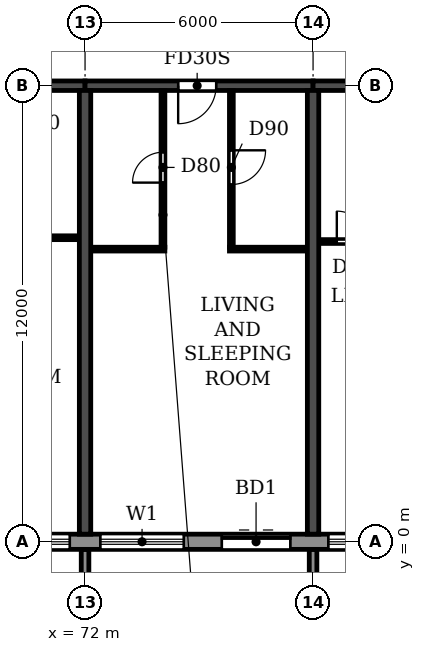
"""IFC4 building model, lengths in metres.
Left out: names, types, materials, properties, quantities, classifications, styles, units other than length and angle.
Written with IfcOpenShell. Run it as: python <this file> out.ifc"""

import sys

from ifc_helpers import new_model, si_unit, direction, frame, frame_2d, origin, place, context, subcontext, project, spatial, polyline, rectangle, outline, extrude, source, transform, mapped, element, fill, save


model = new_model("IFC4")
c1 = context("Model", 3, precision=1e-05, world=origin(), true_north=direction((0.0, 1.0)))
c2 = subcontext(c1, "Body", "Model", "MODEL_VIEW")
j1 = project(units=[si_unit("LENGTHUNIT", "METRE"), si_unit("PLANEANGLEUNIT", "RADIAN")], contexts=[c1])
p1 = place(None, origin())
s1 = spatial("IfcSite", under=j1, at=p1, CompositionType="ELEMENT")
p2 = place(p1, origin())
s2 = spatial("IfcBuilding", under=s1, at=p2, CompositionType="ELEMENT")
p3 = place(p2, frame((0.0, 0.0, 155.4)))
s3 = spatial("IfcBuildingStorey", under=s2, at=p3, CompositionType="ELEMENT", Elevation=155.4)
for number, where, z_axis, x_axis in (
    (1, (72.0, 0.2, 0.0), (0.0, 0.0, 1.0), (0.0, 1.0, 0.0)),
    (2, (78.0, 0.2, 0.0), (0.0, 0.0, 1.0), (0.0, 1.0, 0.0)),
):
    element("IfcWall", number, at=place(p3, frame(where, z_axis=z_axis, x_axis=x_axis)), inside=s3, PredefinedType="SHEAR", context=c2, shape_type="SweptSolid", body=[
        extrude(rectangle(XDim=11.675, YDim=0.3, at=frame_2d((5.837, 0.0))), origin(), (0.0, 0.0, 1.0), 3.0),
    ])
p4 = place(p3, frame((66.0, 12.0, 0.0), z_axis=(0.0, 0.0, 1.0), x_axis=(1.0, 0.0, 0.0)))
e3 = element("IfcWall", 3, at=p4, inside=s3, PredefinedType="SHEAR", context=c2, shape_type="SweptSolid", body=[
    extrude(rectangle(XDim=6.0, YDim=0.25, at=frame_2d((3.0, 0.0))), origin(), (0.0, 0.0, 1.0), 2.4),
])
p5 = place(p4, frame((2.45, 0.0, 0.0)))
e4 = element("IfcOpeningElement", 4, at=p5, cuts=e3, PredefinedType="OPENING", context=c2, shape_type="SweptSolid", body=[
    extrude(rectangle(XDim=1.0, YDim=2.1, at=frame_2d((0.5, 1.05))), frame((0.0, 0.135, 0.0), z_axis=(0.0, -1.0, 0.0), x_axis=(1.0, 0.0, 0.0)), (0.0, 0.0, 1.0), 0.27),
])
p6 = place(p3, frame((72.0, 12.0, 0.0), z_axis=(0.0, 0.0, 1.0), x_axis=(1.0, 0.0, 0.0)))
e5 = element("IfcWall", 5, at=p6, inside=s3, PredefinedType="SHEAR", context=c2, shape_type="SweptSolid", body=[
    extrude(rectangle(XDim=6.0, YDim=0.25, at=frame_2d((3.0, 0.0))), origin(), (0.0, 0.0, 1.0), 2.4),
])
p7 = place(p6, frame((2.45, 0.0, 0.0)))
e6 = element("IfcOpeningElement", 6, at=p7, cuts=e5, PredefinedType="OPENING", context=c2, shape_type="SweptSolid", body=[
    extrude(rectangle(XDim=1.0, YDim=2.1, at=frame_2d((0.5, 1.05))), frame((0.0, 0.135, 0.0), z_axis=(0.0, -1.0, 0.0), x_axis=(1.0, 0.0, 0.0)), (0.0, 0.0, 1.0), 0.27),
])
p8 = place(p3, frame((78.0, 12.0, 0.0), z_axis=(0.0, 0.0, 1.0), x_axis=(1.0, 0.0, 0.0)))
e7 = element("IfcWall", 7, at=p8, inside=s3, PredefinedType="SHEAR", context=c2, shape_type="SweptSolid", body=[
    extrude(rectangle(XDim=6.0, YDim=0.25, at=frame_2d((3.0, 0.0))), origin(), (0.0, 0.0, 1.0), 2.4),
])
p9 = place(p8, frame((2.45, 0.0, 0.0)))
e8 = element("IfcOpeningElement", 8, at=p9, cuts=e7, PredefinedType="OPENING", context=c2, shape_type="SweptSolid", body=[
    extrude(rectangle(XDim=1.0, YDim=2.1, at=frame_2d((0.5, 1.05))), frame((0.0, 0.135, 0.0), z_axis=(0.0, -1.0, 0.0), x_axis=(1.0, 0.0, 0.0)), (0.0, 0.0, 1.0), 0.27),
])
p10 = place(p3, frame((16.683, 0.0, 0.0), z_axis=(0.0, 0.0, 1.0), x_axis=(1.0, 0.0, 0.0)))
e9 = element("IfcWall", 9, at=p10, inside=s3, PredefinedType="STANDARD", context=c2, shape_type="SweptSolid", body=[
    extrude(rectangle(XDim=68.634, YDim=0.4, at=frame_2d((34.317, 0.0))), origin(), (0.0, 0.0, 1.0), 3.0),
])
p11 = place(p10, frame((1.717, 0.0, 0.9)))
e10 = element("IfcOpeningElement", 10, at=p11, cuts=e9, PredefinedType="OPENING", context=c2, shape_type="SweptSolid", body=[
    extrude(rectangle(XDim=2.2, YDim=1.5, at=frame_2d((1.1, 0.75))), frame((0.0, 0.21, 0.0), z_axis=(0.0, -1.0, 0.0), x_axis=(1.0, 0.0, 0.0)), (0.0, 0.0, 1.0), 0.42),
])
p12 = place(p10, frame((4.717, 0.0, 0.9)))
e11 = element("IfcOpeningElement", 11, at=p12, cuts=e9, PredefinedType="OPENING", context=c2, shape_type="SweptSolid", body=[
    extrude(rectangle(XDim=2.2, YDim=1.5, at=frame_2d((1.1, 0.75))), frame((0.0, 0.21, 0.0), z_axis=(0.0, -1.0, 0.0), x_axis=(1.0, 0.0, 0.0)), (0.0, 0.0, 1.0), 0.42),
])
p13 = place(p10, frame((7.917, 0.0, 0.0)))
e12 = element("IfcOpeningElement", 12, at=p13, cuts=e9, PredefinedType="OPENING", context=c2, shape_type="SweptSolid", body=[
    extrude(rectangle(XDim=1.8, YDim=2.4, at=frame_2d((0.9, 1.2))), frame((0.0, 0.21, 0.0), z_axis=(0.0, -1.0, 0.0), x_axis=(1.0, 0.0, 0.0)), (0.0, 0.0, 1.0), 0.42),
])
p14 = place(p10, frame((10.717, 0.0, 0.9)))
e13 = element("IfcOpeningElement", 13, at=p14, cuts=e9, PredefinedType="OPENING", context=c2, shape_type="SweptSolid", body=[
    extrude(rectangle(XDim=2.2, YDim=1.5, at=frame_2d((1.1, 0.75))), frame((0.0, 0.21, 0.0), z_axis=(0.0, -1.0, 0.0), x_axis=(1.0, 0.0, 0.0)), (0.0, 0.0, 1.0), 0.42),
])
p15 = place(p10, frame((13.717, 0.0, 0.9)))
e14 = element("IfcOpeningElement", 14, at=p15, cuts=e9, PredefinedType="OPENING", context=c2, shape_type="SweptSolid", body=[
    extrude(rectangle(XDim=2.2, YDim=1.5, at=frame_2d((1.1, 0.75))), frame((0.0, 0.21, 0.0), z_axis=(0.0, -1.0, 0.0), x_axis=(1.0, 0.0, 0.0)), (0.0, 0.0, 1.0), 0.42),
])
p16 = place(p10, frame((16.717, 0.0, 0.9)))
e15 = element("IfcOpeningElement", 15, at=p16, cuts=e9, PredefinedType="OPENING", context=c2, shape_type="SweptSolid", body=[
    extrude(rectangle(XDim=2.2, YDim=1.5, at=frame_2d((1.1, 0.75))), frame((0.0, 0.21, 0.0), z_axis=(0.0, -1.0, 0.0), x_axis=(1.0, 0.0, 0.0)), (0.0, 0.0, 1.0), 0.42),
])
p17 = place(p10, frame((19.717, 0.0, 0.9)))
e16 = element("IfcOpeningElement", 16, at=p17, cuts=e9, PredefinedType="OPENING", context=c2, shape_type="SweptSolid", body=[
    extrude(rectangle(XDim=2.2, YDim=1.5, at=frame_2d((1.1, 0.75))), frame((0.0, 0.21, 0.0), z_axis=(0.0, -1.0, 0.0), x_axis=(1.0, 0.0, 0.0)), (0.0, 0.0, 1.0), 0.42),
])
p18 = place(p10, frame((22.917, 0.0, 0.0)))
e17 = element("IfcOpeningElement", 17, at=p18, cuts=e9, PredefinedType="OPENING", context=c2, shape_type="SweptSolid", body=[
    extrude(rectangle(XDim=1.8, YDim=2.4, at=frame_2d((0.9, 1.2))), frame((0.0, 0.21, 0.0), z_axis=(0.0, -1.0, 0.0), x_axis=(1.0, 0.0, 0.0)), (0.0, 0.0, 1.0), 0.42),
])
p19 = place(p10, frame((25.717, 0.0, 0.9)))
e18 = element("IfcOpeningElement", 18, at=p19, cuts=e9, PredefinedType="OPENING", context=c2, shape_type="SweptSolid", body=[
    extrude(rectangle(XDim=2.2, YDim=1.5, at=frame_2d((1.1, 0.75))), frame((0.0, 0.21, 0.0), z_axis=(0.0, -1.0, 0.0), x_axis=(1.0, 0.0, 0.0)), (0.0, 0.0, 1.0), 0.42),
])
p20 = place(p10, frame((28.717, 0.0, 0.9)))
e19 = element("IfcOpeningElement", 19, at=p20, cuts=e9, PredefinedType="OPENING", context=c2, shape_type="SweptSolid", body=[
    extrude(rectangle(XDim=2.2, YDim=1.5, at=frame_2d((1.1, 0.75))), frame((0.0, 0.21, 0.0), z_axis=(0.0, -1.0, 0.0), x_axis=(1.0, 0.0, 0.0)), (0.0, 0.0, 1.0), 0.42),
])
p21 = place(p10, frame((31.917, 0.0, 0.0)))
e20 = element("IfcOpeningElement", 20, at=p21, cuts=e9, PredefinedType="OPENING", context=c2, shape_type="SweptSolid", body=[
    extrude(rectangle(XDim=1.8, YDim=2.4, at=frame_2d((0.9, 1.2))), frame((0.0, 0.21, 0.0), z_axis=(0.0, -1.0, 0.0), x_axis=(1.0, 0.0, 0.0)), (0.0, 0.0, 1.0), 0.42),
])
p22 = place(p10, frame((34.717, 0.0, 0.9)))
e21 = element("IfcOpeningElement", 21, at=p22, cuts=e9, PredefinedType="OPENING", context=c2, shape_type="SweptSolid", body=[
    extrude(rectangle(XDim=2.2, YDim=1.5, at=frame_2d((1.1, 0.75))), frame((0.0, 0.21, 0.0), z_axis=(0.0, -1.0, 0.0), x_axis=(1.0, 0.0, 0.0)), (0.0, 0.0, 1.0), 0.42),
])
p23 = place(p10, frame((37.717, 0.0, 0.9)))
e22 = element("IfcOpeningElement", 22, at=p23, cuts=e9, PredefinedType="OPENING", context=c2, shape_type="SweptSolid", body=[
    extrude(rectangle(XDim=2.2, YDim=1.5, at=frame_2d((1.1, 0.75))), frame((0.0, 0.21, 0.0), z_axis=(0.0, -1.0, 0.0), x_axis=(1.0, 0.0, 0.0)), (0.0, 0.0, 1.0), 0.42),
])
p24 = place(p10, frame((40.717, 0.0, 0.9)))
e23 = element("IfcOpeningElement", 23, at=p24, cuts=e9, PredefinedType="OPENING", context=c2, shape_type="SweptSolid", body=[
    extrude(rectangle(XDim=2.2, YDim=1.5, at=frame_2d((1.1, 0.75))), frame((0.0, 0.21, 0.0), z_axis=(0.0, -1.0, 0.0), x_axis=(1.0, 0.0, 0.0)), (0.0, 0.0, 1.0), 0.42),
])
p25 = place(p10, frame((43.717, 0.0, 0.9)))
e24 = element("IfcOpeningElement", 24, at=p25, cuts=e9, PredefinedType="OPENING", context=c2, shape_type="SweptSolid", body=[
    extrude(rectangle(XDim=2.2, YDim=1.5, at=frame_2d((1.1, 0.75))), frame((0.0, 0.21, 0.0), z_axis=(0.0, -1.0, 0.0), x_axis=(1.0, 0.0, 0.0)), (0.0, 0.0, 1.0), 0.42),
])
p26 = place(p10, frame((46.917, 0.0, 0.0)))
e25 = element("IfcOpeningElement", 25, at=p26, cuts=e9, PredefinedType="OPENING", context=c2, shape_type="SweptSolid", body=[
    extrude(rectangle(XDim=1.8, YDim=2.4, at=frame_2d((0.9, 1.2))), frame((0.0, 0.21, 0.0), z_axis=(0.0, -1.0, 0.0), x_axis=(1.0, 0.0, 0.0)), (0.0, 0.0, 1.0), 0.42),
])
p27 = place(p10, frame((49.717, 0.0, 0.9)))
e26 = element("IfcOpeningElement", 26, at=p27, cuts=e9, PredefinedType="OPENING", context=c2, shape_type="SweptSolid", body=[
    extrude(rectangle(XDim=2.2, YDim=1.5, at=frame_2d((1.1, 0.75))), frame((0.0, 0.21, 0.0), z_axis=(0.0, -1.0, 0.0), x_axis=(1.0, 0.0, 0.0)), (0.0, 0.0, 1.0), 0.42),
])
p28 = place(p10, frame((52.717, 0.0, 0.9)))
e27 = element("IfcOpeningElement", 27, at=p28, cuts=e9, PredefinedType="OPENING", context=c2, shape_type="SweptSolid", body=[
    extrude(rectangle(XDim=2.2, YDim=1.5, at=frame_2d((1.1, 0.75))), frame((0.0, 0.21, 0.0), z_axis=(0.0, -1.0, 0.0), x_axis=(1.0, 0.0, 0.0)), (0.0, 0.0, 1.0), 0.42),
])
p29 = place(p10, frame((55.717, 0.0, 0.9)))
e28 = element("IfcOpeningElement", 28, at=p29, cuts=e9, PredefinedType="OPENING", context=c2, shape_type="SweptSolid", body=[
    extrude(rectangle(XDim=2.2, YDim=1.5, at=frame_2d((1.1, 0.75))), frame((0.0, 0.21, 0.0), z_axis=(0.0, -1.0, 0.0), x_axis=(1.0, 0.0, 0.0)), (0.0, 0.0, 1.0), 0.42),
])
p30 = place(p10, frame((58.917, 0.0, 0.0)))
e29 = element("IfcOpeningElement", 29, at=p30, cuts=e9, PredefinedType="OPENING", context=c2, shape_type="SweptSolid", body=[
    extrude(rectangle(XDim=1.8, YDim=2.4, at=frame_2d((0.9, 1.2))), frame((0.0, 0.21, 0.0), z_axis=(0.0, -1.0, 0.0), x_axis=(1.0, 0.0, 0.0)), (0.0, 0.0, 1.0), 0.42),
])
p31 = place(p10, frame((61.717, 0.0, 0.9)))
e30 = element("IfcOpeningElement", 30, at=p31, cuts=e9, PredefinedType="OPENING", context=c2, shape_type="SweptSolid", body=[
    extrude(rectangle(XDim=2.2, YDim=1.5, at=frame_2d((1.1, 0.75))), frame((0.0, 0.21, 0.0), z_axis=(0.0, -1.0, 0.0), x_axis=(1.0, 0.0, 0.0)), (0.0, 0.0, 1.0), 0.42),
])
p32 = place(p10, frame((64.717, 0.0, 0.9)))
e31 = element("IfcOpeningElement", 31, at=p32, cuts=e9, PredefinedType="OPENING", context=c2, shape_type="SweptSolid", body=[
    extrude(rectangle(XDim=2.2, YDim=1.5, at=frame_2d((1.1, 0.75))), frame((0.0, 0.21, 0.0), z_axis=(0.0, -1.0, 0.0), x_axis=(1.0, 0.0, 0.0)), (0.0, 0.0, 1.0), 0.42),
])
m1 = source(origin(), c2, "Body", "SweptSolid", [
    extrude(outline(polyline([(0.0, 0.0), (0.2, 0.0), (0.2, 1.65), (0.0, 1.65), (0.0, 0.0)])), origin(), (0.0, 0.0, 1.0), 3.1),
])
for number, where in (
    (32, (71.9, -1.85, 0.0)),
    (33, (77.9, -1.85, 0.0)),
):
    element("IfcWall", number, at=place(p3, frame(where)), inside=s3, PredefinedType="STANDARD", context=c2, shape_type="MappedRepresentation", body=[
        mapped(m1, transform((0.0, 0.0, 0.0))),
    ])
p33 = place(p3, frame((72.16, 7.7, 0.0), z_axis=(0.0, 0.0, 1.0), x_axis=(1.0, 0.0, 0.0)))
e34 = element("IfcWall", 34, at=p33, inside=s3, PredefinedType="PARTITIONING", context=c2, shape_type="SweptSolid", body=[
    extrude(rectangle(XDim=1.94, YDim=0.1, at=frame_2d((0.97, 0.0))), origin(), (0.0, 0.0, 1.0), 3.0),
])
p34 = place(p3, frame((75.8, 7.7, 0.0), z_axis=(0.0, 0.0, 1.0), x_axis=(1.0, 0.0, 0.0)))
e35 = element("IfcWall", 35, at=p34, inside=s3, PredefinedType="PARTITIONING", context=c2, shape_type="SweptSolid", body=[
    extrude(rectangle(XDim=2.04, YDim=0.1, at=frame_2d((1.02, 0.0))), origin(), (0.0, 0.0, 1.0), 3.0),
])
p35 = place(p3, frame((78.16, 7.9, 0.0), z_axis=(0.0, 0.0, 1.0), x_axis=(1.0, 0.0, 0.0)))
e36 = element("IfcWall", 36, at=p35, inside=s3, PredefinedType="PARTITIONING", context=c2, shape_type="SweptSolid", body=[
    extrude(rectangle(XDim=1.94, YDim=0.1, at=frame_2d((0.97, 0.0))), origin(), (0.0, 0.0, 1.0), 3.0),
])
p36 = place(p35, frame((0.465, 0.0, 0.0)))
e37 = element("IfcOpeningElement", 37, at=p36, cuts=e36, PredefinedType="OPENING", context=c2, shape_type="SweptSolid", body=[
    extrude(rectangle(XDim=0.8, YDim=2.1, at=frame_2d((0.4, 1.05))), frame((0.0, 0.06, 0.0), z_axis=(0.0, -1.0, 0.0), x_axis=(1.0, 0.0, 0.0)), (0.0, 0.0, 1.0), 0.12),
])
p37 = place(p3, frame((69.8, 8.0, 0.0), z_axis=(0.0, 0.0, 1.0), x_axis=(1.0, 0.0, 0.0)))
e38 = element("IfcWall", 38, at=p37, inside=s3, PredefinedType="PARTITIONING", context=c2, shape_type="SweptSolid", body=[
    extrude(rectangle(XDim=2.04, YDim=0.1, at=frame_2d((1.02, 0.0))), origin(), (0.0, 0.0, 1.0), 3.0),
])
p38 = place(p3, frame((74.05, 7.75, 0.0), z_axis=(0.0, 0.0, 1.0), x_axis=(0.0, 1.0, 0.0)))
e39 = element("IfcWall", 39, at=p38, inside=s3, PredefinedType="PARTITIONING", context=c2, shape_type="SweptSolid", body=[
    extrude(rectangle(XDim=4.115, YDim=0.1, at=frame_2d((2.058, 0.0))), origin(), (0.0, 0.0, 1.0), 3.0),
])
p39 = place(p38, frame((1.7, 0.0, 0.0)))
e40 = element("IfcOpeningElement", 40, at=p39, cuts=e39, PredefinedType="OPENING", context=c2, shape_type="SweptSolid", body=[
    extrude(rectangle(XDim=0.8, YDim=2.1, at=frame_2d((0.4, 1.05))), frame((0.0, 0.06, 0.0), z_axis=(0.0, -1.0, 0.0), x_axis=(1.0, 0.0, 0.0)), (0.0, 0.0, 1.0), 0.12),
])
p40 = place(p3, frame((75.85, 7.75, 0.0), z_axis=(0.0, 0.0, 1.0), x_axis=(0.0, 1.0, 0.0)))
e41 = element("IfcWall", 41, at=p40, inside=s3, PredefinedType="PARTITIONING", context=c2, shape_type="SweptSolid", body=[
    extrude(rectangle(XDim=4.115, YDim=0.1, at=frame_2d((2.058, 0.0))), origin(), (0.0, 0.0, 1.0), 3.0),
])
p41 = place(p40, frame((1.65, 0.0, 0.0)))
e42 = element("IfcOpeningElement", 42, at=p41, cuts=e41, PredefinedType="OPENING", context=c2, shape_type="SweptSolid", body=[
    extrude(rectangle(XDim=0.9, YDim=2.1, at=frame_2d((0.45, 1.05))), frame((0.0, 0.06, 0.0), z_axis=(0.0, -1.0, 0.0), x_axis=(1.0, 0.0, 0.0)), (0.0, 0.0, 1.0), 0.12),
])
p42 = place(p28, origin())
e43 = element("IfcWindow", 43, at=p42, inside=s3, PartitioningType="DOUBLE_PANEL_HORIZONTAL", PredefinedType="WINDOW", context=c2, shape_type="SweptSolid", body=[
    extrude(rectangle(XDim=2.2, YDim=1.5, at=frame_2d((1.1, 0.75))), frame((0.0, 0.03, 0.0), z_axis=(0.0, -1.0, 0.0), x_axis=(1.0, 0.0, 0.0)), (0.0, 0.0, 1.0), 0.06),
])
fill(e27, e43)
p43 = place(p29, origin())
e44 = element("IfcWindow", 44, at=p43, inside=s3, PartitioningType="DOUBLE_PANEL_HORIZONTAL", PredefinedType="WINDOW", context=c2, shape_type="SweptSolid", body=[
    extrude(rectangle(XDim=2.2, YDim=1.5, at=frame_2d((1.1, 0.75))), frame((0.0, 0.03, 0.0), z_axis=(0.0, -1.0, 0.0), x_axis=(1.0, 0.0, 0.0)), (0.0, 0.0, 1.0), 0.06),
])
fill(e28, e44)
p44 = place(p30, origin())
e45 = element("IfcDoor", 45, at=p44, inside=s3, OperationType="DOUBLE_DOOR_SLIDING", PredefinedType="DOOR", context=c2, shape_type="SweptSolid", body=[
    extrude(rectangle(XDim=1.8, YDim=2.4, at=frame_2d((0.9, 1.2))), frame((0.0, 0.025, 0.0), z_axis=(0.0, -1.0, 0.0), x_axis=(1.0, 0.0, 0.0)), (0.0, 0.0, 1.0), 0.05),
])
fill(e29, e45)
p45 = place(p31, origin())
e46 = element("IfcWindow", 46, at=p45, inside=s3, PartitioningType="DOUBLE_PANEL_HORIZONTAL", PredefinedType="WINDOW", context=c2, shape_type="SweptSolid", body=[
    extrude(rectangle(XDim=2.2, YDim=1.5, at=frame_2d((1.1, 0.75))), frame((0.0, 0.03, 0.0), z_axis=(0.0, -1.0, 0.0), x_axis=(1.0, 0.0, 0.0)), (0.0, 0.0, 1.0), 0.06),
])
fill(e30, e46)
p46 = place(p39, origin())
e47 = element("IfcDoor", 47, at=p46, inside=s3, OperationType="SINGLE_SWING_LEFT", PredefinedType="DOOR", context=c2, shape_type="SweptSolid", body=[
    extrude(rectangle(XDim=0.8, YDim=2.1, at=frame_2d((0.4, 1.05))), frame((0.0, 0.025, 0.0), z_axis=(0.0, -1.0, 0.0), x_axis=(1.0, 0.0, 0.0)), (0.0, 0.0, 1.0), 0.05),
])
fill(e40, e47)
p47 = place(p7, frame((1.0, 0.0, 0.0), z_axis=(0.0, 0.0, 1.0), x_axis=(-1.0, 0.0, 0.0)))
e48 = element("IfcDoor", 48, at=p47, inside=s3, OperationType="SINGLE_SWING_RIGHT", PredefinedType="DOOR", context=c2, shape_type="SweptSolid", body=[
    extrude(rectangle(XDim=1.0, YDim=2.1, at=frame_2d((0.5, 1.05))), frame((0.0, 0.025, 0.0), z_axis=(0.0, -1.0, 0.0), x_axis=(1.0, 0.0, 0.0)), (0.0, 0.0, 1.0), 0.05),
])
fill(e6, e48)
p48 = place(p41, frame((0.9, 0.0, 0.0), z_axis=(0.0, 0.0, 1.0), x_axis=(-1.0, 0.0, 0.0)))
e49 = element("IfcDoor", 49, at=p48, inside=s3, OperationType="SINGLE_SWING_LEFT", PredefinedType="DOOR", context=c2, shape_type="SweptSolid", body=[
    extrude(rectangle(XDim=0.9, YDim=2.1, at=frame_2d((0.45, 1.05))), frame((0.0, 0.025, 0.0), z_axis=(0.0, -1.0, 0.0), x_axis=(1.0, 0.0, 0.0)), (0.0, 0.0, 1.0), 0.05),
])
fill(e42, e49)
p49 = place(p36, origin())
e50 = element("IfcDoor", 50, at=p49, inside=s3, OperationType="SINGLE_SWING_LEFT", PredefinedType="DOOR", context=c2, shape_type="SweptSolid", body=[
    extrude(rectangle(XDim=0.8, YDim=2.1, at=frame_2d((0.4, 1.05))), frame((0.0, 0.025, 0.0), z_axis=(0.0, -1.0, 0.0), x_axis=(1.0, 0.0, 0.0)), (0.0, 0.0, 1.0), 0.05),
])
fill(e37, e50)
save(model, sys.argv[1])
